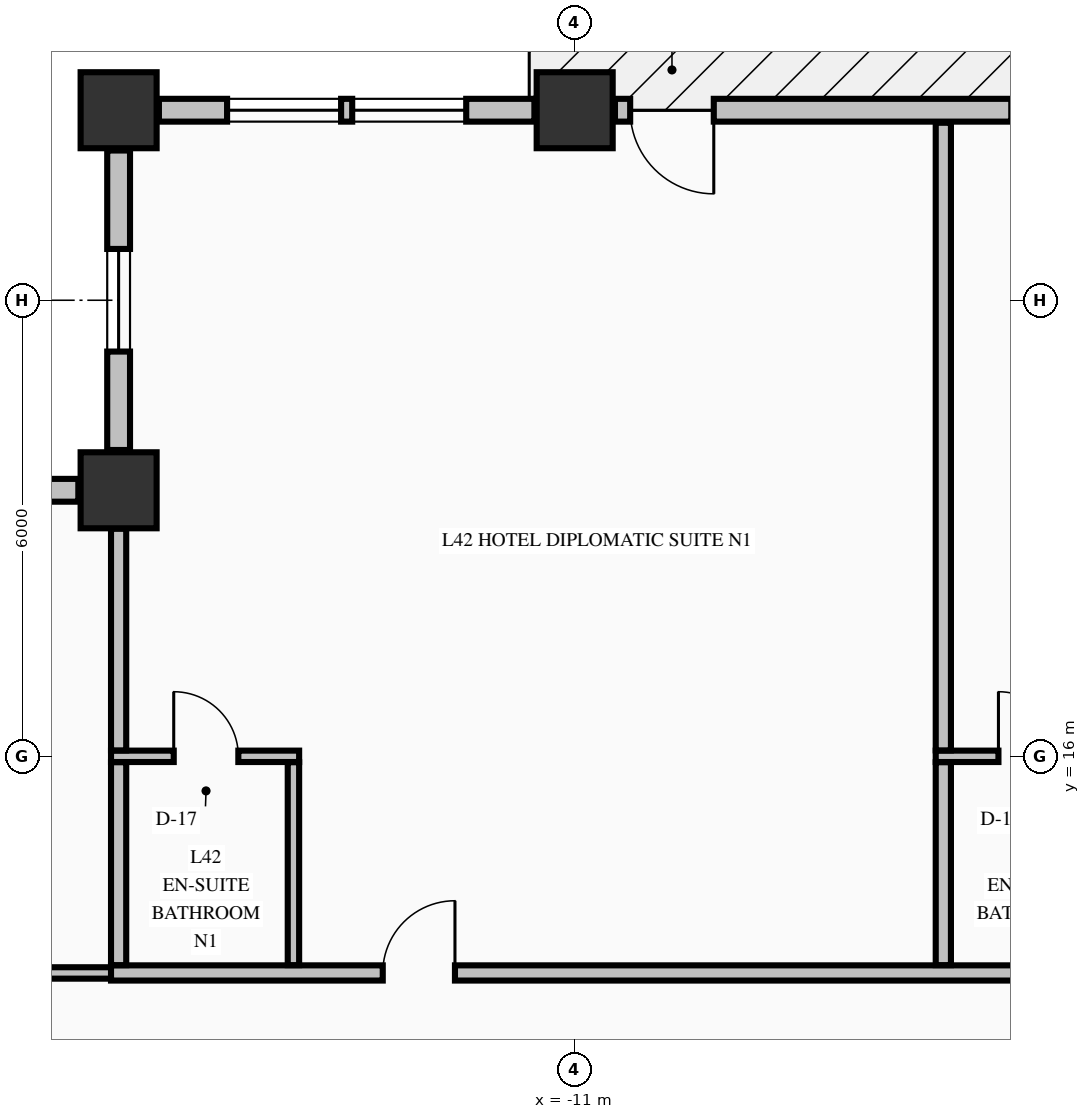
"""IFC4 building model, lengths in metres.
Left out: names, types, materials, properties, quantities, classifications, styles, units other than length and angle.
Written with IfcOpenShell. Run it as: python <this file> out.ifc"""

import sys

from ifc_helpers import new_model, si_unit, direction, frame, frame_2d, origin, origin_2d, place, context, subcontext, project, spatial, rectangle, extrude, element, fill, save


model = new_model("IFC4")
c1 = context("Model", 3, precision=1e-05, world=origin(), true_north=direction((0.0, 1.0)))
c2 = subcontext(c1, "Body", "Model", "MODEL_VIEW")
j1 = project(units=[si_unit("LENGTHUNIT", "METRE"), si_unit("PLANEANGLEUNIT", "RADIAN")], contexts=[c1])
p1 = place(None, origin())
s1 = spatial("IfcSite", under=j1, at=p1, CompositionType="ELEMENT")
p2 = place(p1, origin())
s2 = spatial("IfcBuilding", under=s1, at=p2, CompositionType="ELEMENT")
p3 = place(p2, frame((0.0, 0.0, 166.06)))
s3 = spatial("IfcBuildingStorey", under=s2, at=p3, CompositionType="ELEMENT", Elevation=166.06)
for number, where, z_axis, x_axis in (
    (1, (-17.0, 24.5, -0.25), (0.0, 0.0, 1.0), (1.0, 0.0, 0.0)),
    (2, (-11.0, 24.5, -0.25), (0.0, 0.0, 1.0), (1.0, 0.0, 0.0)),
    (3, (-17.0, 19.5, -0.25), (0.0, 0.0, 1.0), (1.0, 0.0, 0.0)),
):
    element("IfcColumn", number, at=place(p3, frame(where, z_axis=z_axis, x_axis=x_axis)), inside=s3, PredefinedType="COLUMN", context=c2, shape_type="SweptSolid", body=[
        extrude(rectangle(XDim=1.0, YDim=1.0, at=origin_2d()), origin(), (0.0, 0.0, 1.0), 3.4),
    ])
p4 = place(p3, frame((-17.0, 23.97, 0.0), z_axis=(0.0, 0.0, 1.0), x_axis=(0.0, -1.0, 0.0)))
e4 = element("IfcWall", 4, at=p4, inside=s3, PredefinedType="STANDARD", context=c2, shape_type="SweptSolid", body=[
    extrude(rectangle(XDim=3.94, YDim=0.3, at=frame_2d((1.97, 0.0))), origin(), (0.0, 0.0, 1.0), 2.542),
])
p5 = place(p4, frame((1.295, 0.0, 0.68)))
e5 = element("IfcOpeningElement", 5, at=p5, cuts=e4, PredefinedType="OPENING", context=c2, shape_type="SweptSolid", body=[
    extrude(rectangle(XDim=1.35, YDim=1.42, at=frame_2d((0.675, 0.71))), frame((0.0, 0.16, 0.0), z_axis=(0.0, -1.0, 0.0), x_axis=(1.0, 0.0, 0.0)), (0.0, 0.0, 1.0), 0.32),
])
p6 = place(p3, frame((-17.53, 19.5, 0.0), z_axis=(0.0, 0.0, 1.0), x_axis=(-1.0, 0.0, 0.0)))
e6 = element("IfcWall", 6, at=p6, inside=s3, PredefinedType="STANDARD", context=c2, shape_type="SweptSolid", body=[
    extrude(rectangle(XDim=3.94, YDim=0.3, at=frame_2d((1.97, 0.0))), origin(), (0.0, 0.0, 1.0), 2.542),
])
p7 = place(p6, frame((1.295, 0.0, 0.68)))
e7 = element("IfcOpeningElement", 7, at=p7, cuts=e6, PredefinedType="OPENING", context=c2, shape_type="SweptSolid", body=[
    extrude(rectangle(XDim=1.35, YDim=1.42, at=frame_2d((0.675, 0.71))), frame((0.0, 0.16, 0.0), z_axis=(0.0, -1.0, 0.0), x_axis=(1.0, 0.0, 0.0)), (0.0, 0.0, 1.0), 0.32),
])
p8 = place(p3, frame((-11.53, 24.5, 0.0), z_axis=(0.0, 0.0, 1.0), x_axis=(-1.0, 0.0, 0.0)))
e8 = element("IfcWall", 8, at=p8, inside=s3, PredefinedType="STANDARD", context=c2, shape_type="SweptSolid", body=[
    extrude(rectangle(XDim=4.94, YDim=0.3, at=frame_2d((2.47, 0.0))), origin(), (0.0, 0.0, 1.0), 2.542),
])
p9 = place(p8, frame((0.897, 0.0, 0.72)))
e9 = element("IfcOpeningElement", 9, at=p9, cuts=e8, PredefinedType="OPENING", context=c2, shape_type="SweptSolid", body=[
    extrude(rectangle(XDim=1.5, YDim=1.6, at=frame_2d((0.75, 0.8))), frame((0.0, 0.16, 0.0), z_axis=(0.0, -1.0, 0.0), x_axis=(1.0, 0.0, 0.0)), (0.0, 0.0, 1.0), 0.32),
])
p10 = place(p8, frame((2.543, 0.0, 0.72)))
e10 = element("IfcOpeningElement", 10, at=p10, cuts=e8, PredefinedType="OPENING", context=c2, shape_type="SweptSolid", body=[
    extrude(rectangle(XDim=1.5, YDim=1.6, at=frame_2d((0.75, 0.8))), frame((0.0, 0.16, 0.0), z_axis=(0.0, -1.0, 0.0), x_axis=(1.0, 0.0, 0.0)), (0.0, 0.0, 1.0), 0.32),
])
p11 = place(p3, frame((-0.53, 24.5, 0.0), z_axis=(0.0, 0.0, 1.0), x_axis=(-1.0, 0.0, 0.0)))
e11 = element("IfcWall", 11, at=p11, inside=s3, PredefinedType="STANDARD", context=c2, shape_type="SweptSolid", body=[
    extrude(rectangle(XDim=9.94, YDim=0.3, at=frame_2d((4.97, 0.0))), origin(), (0.0, 0.0, 1.0), 2.542),
])
p12 = place(p11, frame((8.64, 0.0, 0.0)))
e12 = element("IfcOpeningElement", 12, at=p12, cuts=e11, PredefinedType="OPENING", context=c2, shape_type="SweptSolid", body=[
    extrude(rectangle(XDim=1.1, YDim=2.15, at=frame_2d((0.55, 1.075))), frame((0.0, 0.16, 0.0), z_axis=(0.0, -1.0, 0.0), x_axis=(1.0, 0.0, 0.0)), (0.0, 0.0, 1.0), 0.32),
])
p13 = place(p11, frame((1.238, 0.0, 0.72)))
e13 = element("IfcOpeningElement", 13, at=p13, cuts=e11, PredefinedType="OPENING", context=c2, shape_type="SweptSolid", body=[
    extrude(rectangle(XDim=1.5, YDim=1.6, at=frame_2d((0.75, 0.8))), frame((0.0, 0.16, 0.0), z_axis=(0.0, -1.0, 0.0), x_axis=(1.0, 0.0, 0.0)), (0.0, 0.0, 1.0), 0.32),
])
p14 = place(p11, frame((3.226, 0.0, 0.72)))
e14 = element("IfcOpeningElement", 14, at=p14, cuts=e11, PredefinedType="OPENING", context=c2, shape_type="SweptSolid", body=[
    extrude(rectangle(XDim=1.5, YDim=1.6, at=frame_2d((0.75, 0.8))), frame((0.0, 0.16, 0.0), z_axis=(0.0, -1.0, 0.0), x_axis=(1.0, 0.0, 0.0)), (0.0, 0.0, 1.0), 0.32),
])
p15 = place(p3, frame((-20.075, 13.15, 0.0), z_axis=(0.0, 0.0, 1.0), x_axis=(1.0, 0.0, 0.0)))
e15 = element("IfcWall", 15, at=p15, inside=s3, PredefinedType="PARTITIONING", context=c2, shape_type="SweptSolid", body=[
    extrude(rectangle(XDim=3.175, YDim=0.15, at=frame_2d((1.587, 0.0))), origin(), (0.0, 0.0, 1.0), 3.15),
])
p16 = place(p3, frame((-17.1, 13.15, 0.0), z_axis=(0.0, 0.0, 1.0), x_axis=(1.0, 0.0, 0.0)))
e16 = element("IfcWall", 16, at=p16, inside=s3, PredefinedType="PARTITIONING", context=c2, shape_type="SweptSolid", body=[
    extrude(rectangle(XDim=39.2, YDim=0.2, at=frame_2d((19.6, 0.0))), origin(), (0.0, 0.0, 1.0), 3.15),
])
p17 = place(p16, frame((3.575, 0.0, 0.0)))
e17 = element("IfcOpeningElement", 17, at=p17, cuts=e16, PredefinedType="OPENING", context=c2, shape_type="SweptSolid", body=[
    extrude(rectangle(XDim=0.95, YDim=2.15, at=frame_2d((0.475, 1.075))), frame((0.0, 0.11, 0.0), z_axis=(0.0, -1.0, 0.0), x_axis=(1.0, 0.0, 0.0)), (0.0, 0.0, 1.0), 0.22),
])
p18 = place(p16, frame((14.625, 0.0, 0.0)))
e18 = element("IfcOpeningElement", 18, at=p18, cuts=e16, PredefinedType="OPENING", context=c2, shape_type="SweptSolid", body=[
    extrude(rectangle(XDim=0.95, YDim=2.15, at=frame_2d((0.475, 1.075))), frame((0.0, 0.11, 0.0), z_axis=(0.0, -1.0, 0.0), x_axis=(1.0, 0.0, 0.0)), (0.0, 0.0, 1.0), 0.22),
])
p19 = place(p16, frame((21.125, 0.0, 0.0)))
e19 = element("IfcOpeningElement", 19, at=p19, cuts=e16, PredefinedType="OPENING", context=c2, shape_type="SweptSolid", body=[
    extrude(rectangle(XDim=0.95, YDim=2.15, at=frame_2d((0.475, 1.075))), frame((0.0, 0.11, 0.0), z_axis=(0.0, -1.0, 0.0), x_axis=(1.0, 0.0, 0.0)), (0.0, 0.0, 1.0), 0.22),
])
p20 = place(p16, frame((27.425, 0.0, 0.0)))
e20 = element("IfcOpeningElement", 20, at=p20, cuts=e16, PredefinedType="OPENING", context=c2, shape_type="SweptSolid", body=[
    extrude(rectangle(XDim=0.95, YDim=2.15, at=frame_2d((0.475, 1.075))), frame((0.0, 0.11, 0.0), z_axis=(0.0, -1.0, 0.0), x_axis=(1.0, 0.0, 0.0)), (0.0, 0.0, 1.0), 0.22),
])
p21 = place(p16, frame((34.605, 0.0, 0.0)))
e21 = element("IfcOpeningElement", 21, at=p21, cuts=e16, PredefinedType="OPENING", context=c2, shape_type="SweptSolid", body=[
    extrude(rectangle(XDim=0.95, YDim=2.15, at=frame_2d((0.475, 1.075))), frame((0.0, 0.11, 0.0), z_axis=(0.0, -1.0, 0.0), x_axis=(1.0, 0.0, 0.0)), (0.0, 0.0, 1.0), 0.22),
])
p22 = place(p3, frame((-17.1, 16.0, 0.0), z_axis=(0.0, 0.0, 1.0), x_axis=(1.0, 0.0, 0.0)))
e22 = element("IfcWall", 22, at=p22, inside=s3, PredefinedType="PARTITIONING", context=c2, shape_type="SweptSolid", body=[
    extrude(rectangle(XDim=2.475, YDim=0.15, at=frame_2d((1.238, 0.0))), origin(), (0.0, 0.0, 1.0), 3.15),
])
p23 = place(p22, frame((0.825, 0.0, 0.0)))
e23 = element("IfcOpeningElement", 23, at=p23, cuts=e22, PredefinedType="OPENING", context=c2, shape_type="SweptSolid", body=[
    extrude(rectangle(XDim=0.85, YDim=2.1, at=frame_2d((0.425, 1.05))), frame((0.0, 0.085, 0.0), z_axis=(0.0, -1.0, 0.0), x_axis=(1.0, 0.0, 0.0)), (0.0, 0.0, 1.0), 0.17),
])
p24 = place(p3, frame((-6.25, 16.0, 0.0), z_axis=(0.0, 0.0, 1.0), x_axis=(1.0, 0.0, 0.0)))
e24 = element("IfcWall", 24, at=p24, inside=s3, PredefinedType="PARTITIONING", context=c2, shape_type="SweptSolid", body=[
    extrude(rectangle(XDim=2.475, YDim=0.15, at=frame_2d((1.238, 0.0))), origin(), (0.0, 0.0, 1.0), 3.15),
])
p25 = place(p24, frame((0.825, 0.0, 0.0)))
e25 = element("IfcOpeningElement", 25, at=p25, cuts=e24, PredefinedType="OPENING", context=c2, shape_type="SweptSolid", body=[
    extrude(rectangle(XDim=0.85, YDim=2.1, at=frame_2d((0.425, 1.05))), frame((0.0, 0.085, 0.0), z_axis=(0.0, -1.0, 0.0), x_axis=(1.0, 0.0, 0.0)), (0.0, 0.0, 1.0), 0.17),
])
p26 = place(p3, frame((-17.0, 13.253, 0.0), z_axis=(0.0, 0.0, 1.0), x_axis=(0.0, 1.0, 0.0)))
e26 = element("IfcWall", 26, at=p26, inside=s3, PredefinedType="PARTITIONING", context=c2, shape_type="SweptSolid", body=[
    extrude(rectangle(XDim=2.669, YDim=0.2, at=frame_2d((1.334, 0.0))), origin(), (0.0, 0.0, 1.0), 3.15),
])
p27 = place(p3, frame((-17.0, 16.078, 0.0), z_axis=(0.0, 0.0, 1.0), x_axis=(0.0, 1.0, 0.0)))
e27 = element("IfcWall", 27, at=p27, inside=s3, PredefinedType="PARTITIONING", context=c2, shape_type="SweptSolid", body=[
    extrude(rectangle(XDim=2.916, YDim=0.2, at=frame_2d((1.458, 0.0))), origin(), (0.0, 0.0, 1.0), 3.15),
])
p28 = place(p3, frame((-14.7, 13.253, 0.0), z_axis=(0.0, 0.0, 1.0), x_axis=(0.0, 1.0, 0.0)))
e28 = element("IfcWall", 28, at=p28, inside=s3, PredefinedType="PARTITIONING", context=c2, shape_type="SweptSolid", body=[
    extrude(rectangle(XDim=2.669, YDim=0.15, at=frame_2d((1.334, 0.0))), origin(), (0.0, 0.0, 1.0), 3.15),
])
p29 = place(p3, frame((-6.15, 13.253, 0.0), z_axis=(0.0, 0.0, 1.0), x_axis=(0.0, 1.0, 0.0)))
e29 = element("IfcWall", 29, at=p29, inside=s3, PredefinedType="PARTITIONING", context=c2, shape_type="SweptSolid", body=[
    extrude(rectangle(XDim=2.669, YDim=0.2, at=frame_2d((1.334, 0.0))), origin(), (0.0, 0.0, 1.0), 3.15),
])
p30 = place(p3, frame((-6.15, 16.078, 0.0), z_axis=(0.0, 0.0, 1.0), x_axis=(0.0, 1.0, 0.0)))
e30 = element("IfcWall", 30, at=p30, inside=s3, PredefinedType="PARTITIONING", context=c2, shape_type="SweptSolid", body=[
    extrude(rectangle(XDim=8.257, YDim=0.2, at=frame_2d((4.128, 0.0))), origin(), (0.0, 0.0, 1.0), 3.15),
])
p31 = place(p5, origin())
e31 = element("IfcWindow", 31, at=p31, inside=s3, PartitioningType="SINGLE_PANEL", PredefinedType="WINDOW", context=c2, shape_type="SweptSolid", body=[
    extrude(rectangle(XDim=1.35, YDim=1.42, at=frame_2d((0.675, 0.71))), frame((0.0, 0.03, 0.0), z_axis=(0.0, -1.0, 0.0), x_axis=(1.0, 0.0, 0.0)), (0.0, 0.0, 1.0), 0.06),
])
fill(e5, e31)
p32 = place(p9, origin())
e32 = element("IfcWindow", 32, at=p32, inside=s3, PartitioningType="SINGLE_PANEL", PredefinedType="WINDOW", context=c2, shape_type="SweptSolid", body=[
    extrude(rectangle(XDim=1.5, YDim=1.6, at=frame_2d((0.75, 0.8))), frame((0.0, 0.03, 0.0), z_axis=(0.0, -1.0, 0.0), x_axis=(1.0, 0.0, 0.0)), (0.0, 0.0, 1.0), 0.06),
])
fill(e9, e32)
p33 = place(p10, origin())
e33 = element("IfcWindow", 33, at=p33, inside=s3, PartitioningType="SINGLE_PANEL", PredefinedType="WINDOW", context=c2, shape_type="SweptSolid", body=[
    extrude(rectangle(XDim=1.5, YDim=1.6, at=frame_2d((0.75, 0.8))), frame((0.0, 0.03, 0.0), z_axis=(0.0, -1.0, 0.0), x_axis=(1.0, 0.0, 0.0)), (0.0, 0.0, 1.0), 0.06),
])
fill(e10, e33)
p34 = place(p12, origin())
e34 = element("IfcDoor", 34, at=p34, inside=s3, OperationType="SINGLE_SWING_LEFT", PredefinedType="DOOR", context=c2, shape_type="SweptSolid", body=[
    extrude(rectangle(XDim=1.1, YDim=2.15, at=frame_2d((0.55, 1.075))), frame((0.0, 0.025, 0.0), z_axis=(0.0, -1.0, 0.0), x_axis=(1.0, 0.0, 0.0)), (0.0, 0.0, 1.0), 0.05),
])
fill(e12, e34)
p35 = place(p17, origin())
e35 = element("IfcDoor", 35, at=p35, inside=s3, OperationType="SINGLE_SWING_RIGHT", PredefinedType="DOOR", context=c2, shape_type="SweptSolid", body=[
    extrude(rectangle(XDim=0.95, YDim=2.15, at=frame_2d((0.475, 1.075))), frame((0.0, 0.025, 0.0), z_axis=(0.0, -1.0, 0.0), x_axis=(1.0, 0.0, 0.0)), (0.0, 0.0, 1.0), 0.05),
])
fill(e17, e35)
p36 = place(p23, origin())
e36 = element("IfcDoor", 36, at=p36, inside=s3, OperationType="SINGLE_SWING_LEFT", PredefinedType="DOOR", context=c2, shape_type="SweptSolid", body=[
    extrude(rectangle(XDim=0.85, YDim=2.1, at=frame_2d((0.425, 1.05))), frame((0.0, 0.025, 0.0), z_axis=(0.0, -1.0, 0.0), x_axis=(1.0, 0.0, 0.0)), (0.0, 0.0, 1.0), 0.05),
])
fill(e23, e36)
p37 = place(p25, origin())
e37 = element("IfcDoor", 37, at=p37, inside=s3, OperationType="SINGLE_SWING_LEFT", PredefinedType="DOOR", context=c2, shape_type="SweptSolid", body=[
    extrude(rectangle(XDim=0.85, YDim=2.1, at=frame_2d((0.425, 1.05))), frame((0.0, 0.025, 0.0), z_axis=(0.0, -1.0, 0.0), x_axis=(1.0, 0.0, 0.0)), (0.0, 0.0, 1.0), 0.05),
])
fill(e25, e37)
save(model, sys.argv[1])
